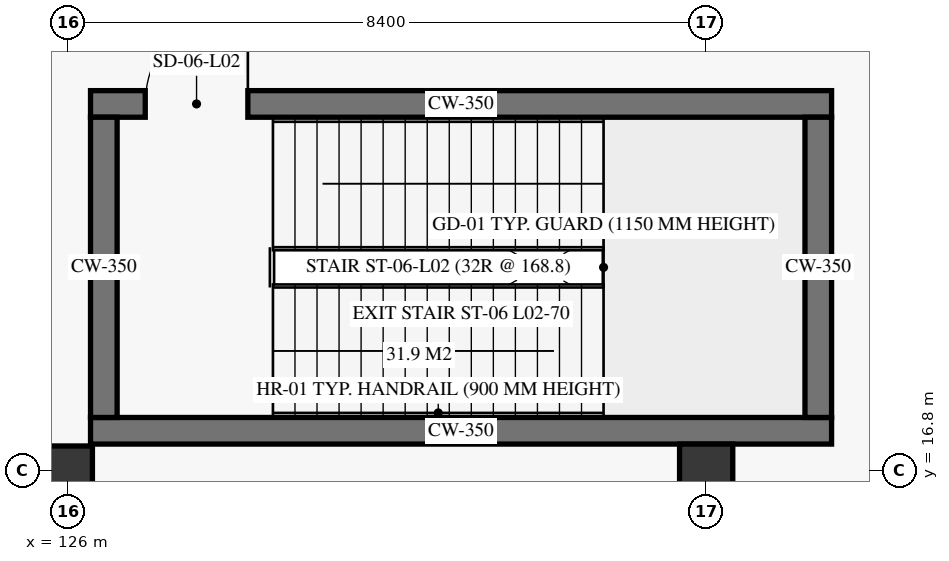
"""IFC4 building model, lengths in metres.
Left out: names, types, materials, properties, quantities, classifications, styles, units other than length and angle.
Written with IfcOpenShell. Run it as: python <this file> out.ifc"""

import sys

from ifc_helpers import new_model, si_unit, direction, frame, frame_2d, origin, origin_2d, place, context, subcontext, project, spatial, rectangle, extrude, element, fill, save


model = new_model("IFC4")
c1 = context("Model", 3, precision=1e-05, world=origin(), true_north=direction((0.0, 1.0)))
c2 = subcontext(c1, "Body", "Model", "MODEL_VIEW")
j1 = project(units=[si_unit("LENGTHUNIT", "METRE"), si_unit("PLANEANGLEUNIT", "RADIAN")], contexts=[c1])
p1 = place(None, origin())
s1 = spatial("IfcSite", under=j1, at=p1, CompositionType="ELEMENT")
p2 = place(p1, origin())
s2 = spatial("IfcBuilding", under=s1, at=p2, CompositionType="ELEMENT")
p3 = place(p2, frame((0.0, 0.0, 6.0)))
s3 = spatial("IfcBuildingStorey", under=s2, at=p3, CompositionType="ELEMENT", Elevation=6.0)
p4 = place(p3, frame((126.0, 16.8, 0.0), z_axis=(0.0, 0.0, 1.0), x_axis=(1.0, 0.0, 0.0)))
e1 = element("IfcColumn", 1, at=p4, inside=s3, PredefinedType="COLUMN", context=c2, shape_type="SweptSolid", body=[
    extrude(rectangle(XDim=0.65, YDim=0.65, at=origin_2d()), origin(), (0.0, 0.0, 1.0), 5.1),
])
p5 = place(p3, frame((134.4, 16.8, 0.0), z_axis=(0.0, 0.0, 1.0), x_axis=(1.0, 0.0, 0.0)))
e2 = element("IfcColumn", 2, at=p5, inside=s3, PredefinedType="COLUMN", context=c2, shape_type="SweptSolid", body=[
    extrude(rectangle(XDim=0.7, YDim=0.7, at=origin_2d()), origin(), (0.0, 0.0, 1.0), 5.1),
])
p6 = place(p3, frame((126.3, 17.325, 0.0), z_axis=(0.0, 0.0, 1.0), x_axis=(1.0, 0.0, 0.0)))
e3 = element("IfcWall", 3, at=p6, inside=s3, PredefinedType="SHEAR", context=c2, shape_type="SweptSolid", body=[
    extrude(rectangle(XDim=9.75, YDim=0.35, at=frame_2d((4.875, 0.0))), origin(), (0.0, 0.0, 1.0), 5.1),
])
p7 = place(p3, frame((126.3, 21.625, 0.0), z_axis=(0.0, 0.0, 1.0), x_axis=(1.0, 0.0, 0.0)))
e4 = element("IfcWall", 4, at=p7, inside=s3, PredefinedType="SHEAR", context=c2, shape_type="SweptSolid", body=[
    extrude(rectangle(XDim=9.75, YDim=0.35, at=frame_2d((4.875, 0.0))), origin(), (0.0, 0.0, 1.0), 5.1),
])
p8 = place(p7, frame((0.72, 0.0, 0.0)))
e5 = element("IfcOpeningElement", 5, at=p8, cuts=e4, PredefinedType="OPENING", context=c2, shape_type="SweptSolid", body=[
    extrude(rectangle(XDim=1.35, YDim=2.25, at=frame_2d((0.675, 1.125))), frame((0.0, 0.185, 0.0), z_axis=(0.0, -1.0, 0.0), x_axis=(1.0, 0.0, 0.0)), (0.0, 0.0, 1.0), 0.37),
])
for number, where, z_axis, x_axis in (
    (6, (126.475, 17.5, 0.0), (0.0, 0.0, 1.0), (0.0, 1.0, 0.0)),
    (7, (135.875, 17.5, 0.0), (0.0, 0.0, 1.0), (0.0, 1.0, 0.0)),
):
    element("IfcWall", number, at=place(p3, frame(where, z_axis=z_axis, x_axis=x_axis)), inside=s3, PredefinedType="SHEAR", context=c2, shape_type="SweptSolid", body=[
        extrude(rectangle(XDim=3.95, YDim=0.35, at=frame_2d((1.975, 0.0))), origin(), (0.0, 0.0, 1.0), 5.1),
    ])
p9 = place(p8, origin())
e8 = element("IfcDoor", 8, at=p9, inside=s3, OperationType="SINGLE_SWING_RIGHT", PredefinedType="DOOR", context=c2, shape_type="SweptSolid", body=[
    extrude(rectangle(XDim=1.35, YDim=2.25, at=frame_2d((0.675, 1.125))), frame((0.0, 0.025, 0.0), z_axis=(0.0, -1.0, 0.0), x_axis=(1.0, 0.0, 0.0)), (0.0, 0.0, 1.0), 0.05),
])
fill(e5, e8)
save(model, sys.argv[1])
